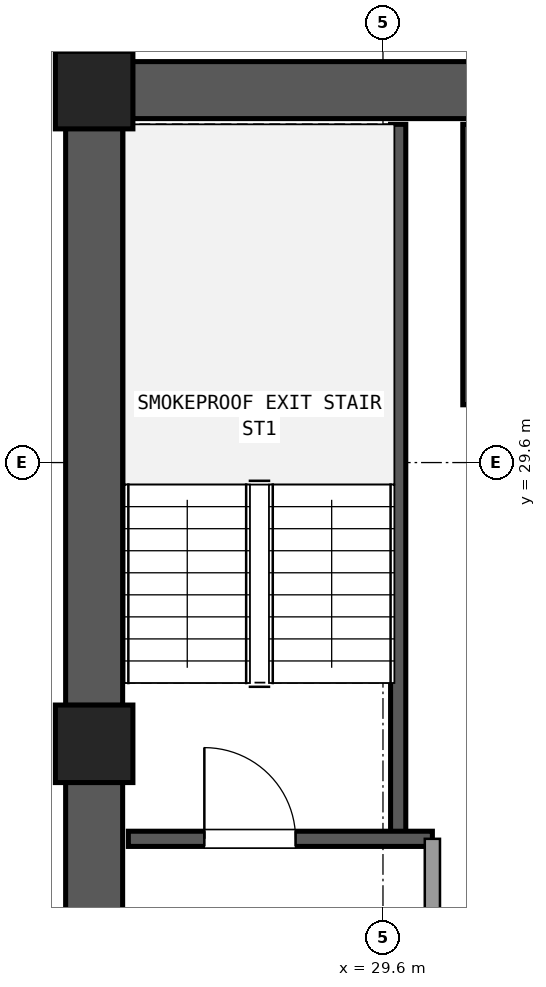
"""IFC4 building model, lengths in metres.
Left out: names, types, materials, properties, quantities, classifications, styles, units other than length and angle.
Written with IfcOpenShell. Run it as: python <this file> out.ifc"""

import sys

from ifc_helpers import new_model, si_unit, direction, frame, frame_2d, origin, origin_2d, place, context, subcontext, project, spatial, rectangle, extrude, element, fill, save


model = new_model("IFC4")
c1 = context("Model", 3, precision=1e-05, world=origin(), true_north=direction((0.0, 1.0)))
c2 = subcontext(c1, "Body", "Model", "MODEL_VIEW")
j1 = project(units=[si_unit("LENGTHUNIT", "METRE"), si_unit("PLANEANGLEUNIT", "RADIAN")], contexts=[c1])
p1 = place(None, origin())
s1 = spatial("IfcSite", under=j1, at=p1, CompositionType="ELEMENT")
p2 = place(p1, origin())
s2 = spatial("IfcBuilding", under=s1, at=p2, CompositionType="ELEMENT")
p3 = place(p2, frame((0.0, 0.0, 156.42)))
s3 = spatial("IfcBuildingStorey", under=s2, at=p3, CompositionType="ELEMENT", Elevation=156.42)
for number, where, z_axis, x_axis in (
    (1, (25.8, 34.5, 0.0), (0.0, 0.0, 1.0), (1.0, 0.0, 0.0)),
    (2, (25.8, 25.9, 0.0), (0.0, 0.0, 1.0), (1.0, 0.0, 0.0)),
):
    element("IfcColumn", number, at=place(p3, frame(where, z_axis=z_axis, x_axis=x_axis)), inside=s3, PredefinedType="COLUMN", context=c2, shape_type="SweptSolid", body=[
        extrude(rectangle(XDim=1.02, YDim=1.02, at=origin_2d()), origin(), (0.0, 0.0, 1.0), 3.6),
    ])
p4 = place(p3, frame((36.495, 34.5, 0.0), z_axis=(0.0, 0.0, 1.0), x_axis=(-1.0, 0.0, 0.0)))
e3 = element("IfcWall", 3, at=p4, inside=s3, PredefinedType="SHEAR", context=c2, shape_type="SweptSolid", body=[
    extrude(rectangle(XDim=10.19, YDim=0.75, at=frame_2d((5.095, 0.0))), origin(), (0.0, 0.0, 1.0), 3.32),
])
p5 = place(p4, frame((4.095, 0.0, 0.0)))
e4 = element("IfcOpeningElement", 4, at=p5, cuts=e3, PredefinedType="OPENING", context=c2, shape_type="SweptSolid", body=[
    extrude(rectangle(XDim=1.2, YDim=2.15, at=frame_2d((0.6, 1.075))), frame((0.0, 0.385, 0.0), z_axis=(0.0, -1.0, 0.0), x_axis=(1.0, 0.0, 0.0)), (0.0, 0.0, 1.0), 0.77),
])
p6 = place(p3, frame((25.8, 33.995, 0.0), z_axis=(0.0, 0.0, 1.0), x_axis=(0.0, -1.0, 0.0)))
e5 = element("IfcWall", 5, at=p6, inside=s3, PredefinedType="SHEAR", context=c2, shape_type="SweptSolid", body=[
    extrude(rectangle(XDim=7.59, YDim=0.75, at=frame_2d((3.795, 0.0))), origin(), (0.0, 0.0, 1.0), 3.32),
])
p7 = place(p3, frame((25.8, 25.395, 0.0), z_axis=(0.0, 0.0, 1.0), x_axis=(0.0, -1.0, 0.0)))
e6 = element("IfcWall", 6, at=p7, inside=s3, PredefinedType="SHEAR", context=c2, shape_type="SweptSolid", body=[
    extrude(rectangle(XDim=7.59, YDim=0.75, at=frame_2d((3.795, 0.0))), origin(), (0.0, 0.0, 1.0), 3.32),
])
p8 = place(p7, frame((2.145, 0.0, 0.0)))
e7 = element("IfcOpeningElement", 7, at=p8, cuts=e6, PredefinedType="OPENING", context=c2, shape_type="SweptSolid", body=[
    extrude(rectangle(XDim=1.2, YDim=2.15, at=frame_2d((0.6, 1.075))), frame((0.0, 0.385, 0.0), z_axis=(0.0, -1.0, 0.0), x_axis=(1.0, 0.0, 0.0)), (0.0, 0.0, 1.0), 0.77),
])
p9 = place(p3, frame((29.8, 24.65, 0.0), z_axis=(0.0, 0.0, 1.0), x_axis=(0.0, 1.0, 0.0)))
e8 = element("IfcWall", 8, at=p9, inside=s3, PredefinedType="SHEAR", context=c2, shape_type="SweptSolid", body=[
    extrude(rectangle(XDim=9.4, YDim=0.2, at=frame_2d((4.7, 0.0))), origin(), (0.0, 0.0, 1.0), 3.32),
])
p10 = place(p3, frame((26.25, 24.65, 0.0), z_axis=(0.0, 0.0, 1.0), x_axis=(1.0, 0.0, 0.0)))
e9 = element("IfcWall", 9, at=p10, inside=s3, PredefinedType="SHEAR", context=c2, shape_type="SweptSolid", body=[
    extrude(rectangle(XDim=4.0, YDim=0.2, at=frame_2d((2.0, 0.0))), origin(), (0.0, 0.0, 1.0), 3.32),
])
p11 = place(p10, frame((1.0, 0.0, 0.0)))
e10 = element("IfcOpeningElement", 10, at=p11, cuts=e9, PredefinedType="OPENING", context=c2, shape_type="SweptSolid", body=[
    extrude(rectangle(XDim=1.2, YDim=2.15, at=frame_2d((0.6, 1.075))), frame((0.0, 0.11, 0.0), z_axis=(0.0, -1.0, 0.0), x_axis=(1.0, 0.0, 0.0)), (0.0, 0.0, 1.0), 0.22),
])
p12 = place(p3, frame((30.75, 30.36, 0.0), z_axis=(0.0, 0.0, 1.0), x_axis=(0.0, 1.0, 0.0)))
e11 = element("IfcWall", 11, at=p12, inside=s3, PredefinedType="SHEAR", context=c2, shape_type="SweptSolid", body=[
    extrude(rectangle(XDim=3.69, YDim=0.2, at=frame_2d((1.845, 0.0))), origin(), (0.0, 0.0, 1.0), 3.32),
])
p13 = place(p3, frame((30.25, 17.75, 0.0), z_axis=(0.0, 0.0, 1.0), x_axis=(0.0, 1.0, 0.0)))
e12 = element("IfcWall", 12, at=p13, inside=s3, PredefinedType="SOLIDWALL", context=c2, shape_type="SweptSolid", body=[
    extrude(rectangle(XDim=6.9, YDim=0.2, at=frame_2d((3.45, 0.0))), origin(), (0.0, 0.0, 1.0), 2.61),
])
p14 = place(p13, frame((4.15, 0.0, 0.0)))
e13 = element("IfcOpeningElement", 13, at=p14, cuts=e12, PredefinedType="OPENING", context=c2, shape_type="SweptSolid", body=[
    extrude(rectangle(XDim=1.2, YDim=2.15, at=frame_2d((0.6, 1.075))), frame((0.0, 0.11, 0.0), z_axis=(0.0, -1.0, 0.0), x_axis=(1.0, 0.0, 0.0)), (0.0, 0.0, 1.0), 0.22),
])
p15 = place(p11, origin())
e14 = element("IfcDoor", 14, at=p15, inside=s3, OperationType="SINGLE_SWING_LEFT", PredefinedType="DOOR", context=c2, shape_type="SweptSolid", body=[
    extrude(rectangle(XDim=1.2, YDim=2.15, at=frame_2d((0.6, 1.075))), frame((0.0, 0.025, 0.0), z_axis=(0.0, -1.0, 0.0), x_axis=(1.0, 0.0, 0.0)), (0.0, 0.0, 1.0), 0.05),
])
fill(e10, e14)
save(model, sys.argv[1])
